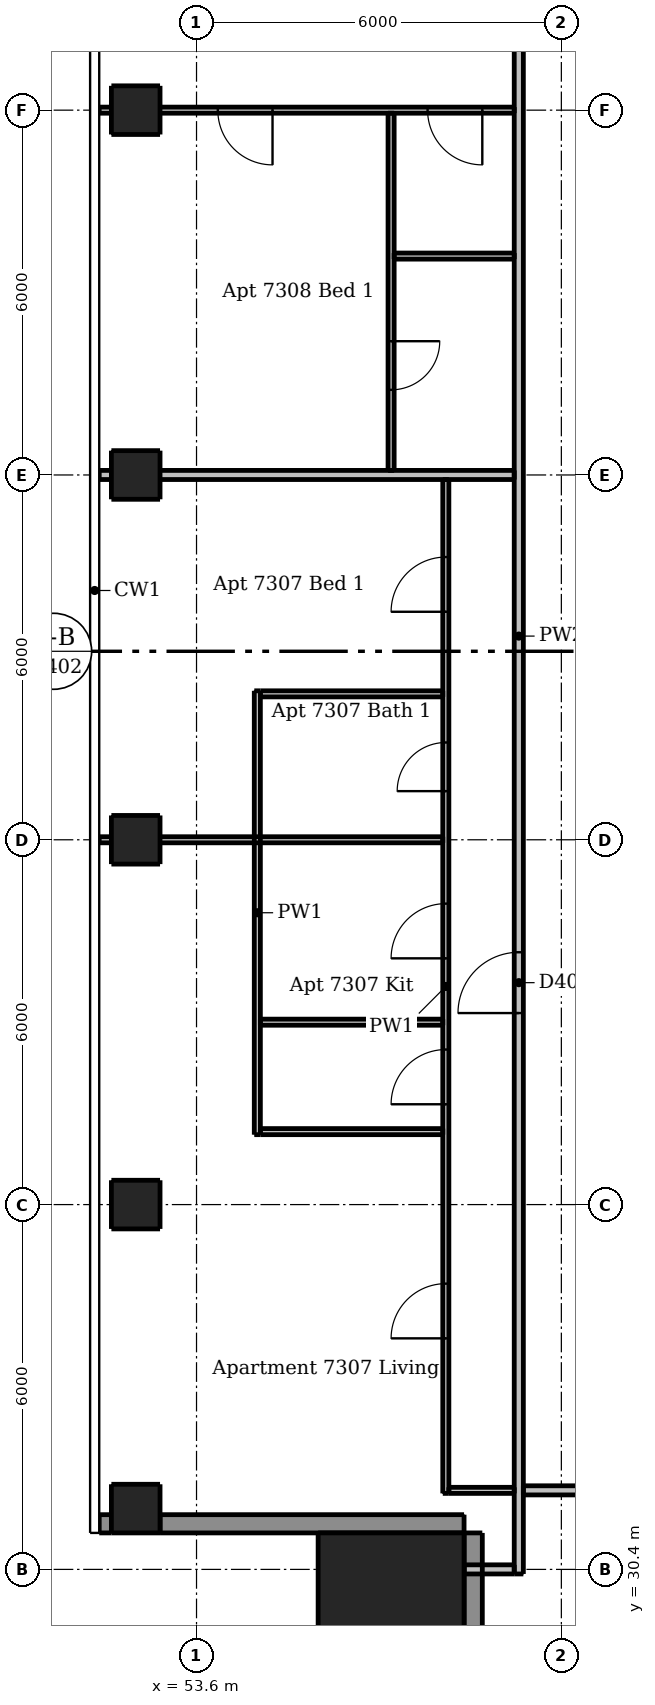
"""IFC4 building model, lengths in metres.
Left out: names, types, materials, properties, quantities, classifications, styles, units other than length and angle.
Written with IfcOpenShell. Run it as: python <this file> out.ifc"""

import sys

from ifc_helpers import new_model, si_unit, direction, frame, frame_2d, origin, origin_2d, place, context, subcontext, project, spatial, rectangle, extrude, element, fill, save


model = new_model("IFC4")
c1 = context("Model", 3, precision=1e-05, world=origin(), true_north=direction((0.0, 1.0)))
c2 = subcontext(c1, "Body", "Model", "MODEL_VIEW")
j1 = project(units=[si_unit("LENGTHUNIT", "METRE"), si_unit("PLANEANGLEUNIT", "RADIAN")], contexts=[c1])
p1 = place(None, origin())
s1 = spatial("IfcSite", under=j1, at=p1, CompositionType="ELEMENT")
p2 = place(p1, origin())
s2 = spatial("IfcBuilding", under=s1, at=p2, CompositionType="ELEMENT")
p3 = place(p2, frame((0.0, 0.0, 271.9)))
s3 = spatial("IfcBuildingStorey", under=s2, at=p3, CompositionType="ELEMENT", Elevation=271.9)
for number, where, z_axis, x_axis in (
    (1, (52.6, 31.4, 0.0), (0.0, 0.0, 1.0), (1.0, 0.0, 0.0)),
    (2, (52.6, 36.4, 0.0), (0.0, 0.0, 1.0), (1.0, 0.0, 0.0)),
    (3, (52.6, 42.4, 0.0), (0.0, 0.0, 1.0), (1.0, 0.0, 0.0)),
    (4, (52.6, 48.4, 0.0), (0.0, 0.0, 1.0), (1.0, 0.0, 0.0)),
    (5, (52.6, 54.4, 0.0), (0.0, 0.0, 1.0), (1.0, 0.0, 0.0)),
):
    element("IfcColumn", number, at=place(p3, frame(where, z_axis=z_axis, x_axis=x_axis)), inside=s3, PredefinedType="COLUMN", context=c2, shape_type="SweptSolid", body=[
        extrude(rectangle(XDim=0.8, YDim=0.8, at=origin_2d()), origin(), (0.0, 0.0, 1.0), 3.05),
    ])
p4 = place(p3, frame((56.8, 29.8, 0.0), z_axis=(0.0, 0.0, 1.0), x_axis=(1.0, 0.0, 0.0)))
e6 = element("IfcColumn", 6, at=p4, inside=s3, PredefinedType="COLUMN", context=c2, shape_type="SweptSolid", body=[
    extrude(rectangle(XDim=2.4, YDim=2.4, at=origin_2d()), origin(), (0.0, 0.0, 1.0), 3.3),
])
p5 = place(p3, frame((52.0, 31.15, 0.0), z_axis=(0.0, 0.0, 1.0), x_axis=(1.0, 0.0, 0.0)))
e7 = element("IfcWall", 7, at=p5, inside=s3, PredefinedType="SOLIDWALL", context=c2, shape_type="SweptSolid", body=[
    extrude(rectangle(XDim=0.2, YDim=0.3, at=frame_2d((0.1, 0.0))), origin(), (0.0, 0.0, 1.0), 3.05),
])
p6 = place(p3, frame((53.0, 31.15, 0.0), z_axis=(0.0, 0.0, 1.0), x_axis=(1.0, 0.0, 0.0)))
e8 = element("IfcWall", 8, at=p6, inside=s3, PredefinedType="SOLIDWALL", context=c2, shape_type="SweptSolid", body=[
    extrude(rectangle(XDim=5.0, YDim=0.3, at=frame_2d((2.5, 0.0))), origin(), (0.0, 0.0, 1.0), 3.05),
])
p7 = place(p3, frame((58.15, 31.0, 0.0), z_axis=(0.0, 0.0, 1.0), x_axis=(0.0, -1.0, 0.0)))
e9 = element("IfcWall", 9, at=p7, inside=s3, PredefinedType="SOLIDWALL", context=c2, shape_type="SweptSolid", body=[
    extrude(rectangle(XDim=6.0, YDim=0.3, at=frame_2d((3.0, 0.0))), origin(), (0.0, 0.0, 1.0), 3.05),
])
p8 = place(p7, frame((1.8, 0.0, 0.15)))
e10 = element("IfcOpeningElement", 10, at=p8, cuts=e9, PredefinedType="OPENING", context=c2, shape_type="SweptSolid", body=[
    extrude(rectangle(XDim=2.4, YDim=2.1, at=frame_2d((1.2, 1.05))), frame((0.0, 0.16, 0.0), z_axis=(0.0, -1.0, 0.0), x_axis=(1.0, 0.0, 0.0)), (0.0, 0.0, 1.0), 0.32),
])
p9 = place(p3, frame((54.6, 37.55, 0.0), z_axis=(0.0, 0.0, 1.0), x_axis=(0.0, 1.0, 0.0)))
e11 = element("IfcWall", 11, at=p9, inside=s3, PredefinedType="PARTITIONING", context=c2, shape_type="SweptSolid", body=[
    extrude(rectangle(XDim=7.3, YDim=0.1, at=frame_2d((3.65, 0.0))), origin(), (0.0, 0.0, 1.0), 3.05),
])
p10 = place(p3, frame((56.8, 54.35, 0.0), z_axis=(0.0, 0.0, 1.0), x_axis=(0.0, -1.0, 0.0)))
e12 = element("IfcWall", 12, at=p10, inside=s3, PredefinedType="PARTITIONING", context=c2, shape_type="SweptSolid", body=[
    extrude(rectangle(XDim=5.875, YDim=0.1, at=frame_2d((2.938, 0.0))), origin(), (0.0, 0.0, 1.0), 3.05),
])
p11 = place(p10, frame((3.75, 0.0, 0.0)))
e13 = element("IfcOpeningElement", 13, at=p11, cuts=e12, PredefinedType="OPENING", context=c2, shape_type="SweptSolid", body=[
    extrude(rectangle(XDim=0.8, YDim=2.1, at=frame_2d((0.4, 1.05))), frame((0.0, 0.06, 0.0), z_axis=(0.0, -1.0, 0.0), x_axis=(1.0, 0.0, 0.0)), (0.0, 0.0, 1.0), 0.12),
])
p12 = place(p3, frame((57.7, 31.65, 0.0), z_axis=(0.0, 0.0, 1.0), x_axis=(0.0, 1.0, 0.0)))
e14 = element("IfcWall", 14, at=p12, inside=s3, PredefinedType="PARTITIONING", context=c2, shape_type="SweptSolid", body=[
    extrude(rectangle(XDim=16.675, YDim=0.1, at=frame_2d((8.337, 0.0))), origin(), (0.0, 0.0, 1.0), 3.05),
])
p13 = place(p12, frame((2.55, 0.0, 0.0)))
e15 = element("IfcOpeningElement", 15, at=p13, cuts=e14, PredefinedType="OPENING", context=c2, shape_type="SweptSolid", body=[
    extrude(rectangle(XDim=0.9, YDim=2.1, at=frame_2d((0.45, 1.05))), frame((0.0, 0.06, 0.0), z_axis=(0.0, -1.0, 0.0), x_axis=(1.0, 0.0, 0.0)), (0.0, 0.0, 1.0), 0.12),
])
p14 = place(p12, frame((8.8, 0.0, 0.0)))
e16 = element("IfcOpeningElement", 16, at=p14, cuts=e14, PredefinedType="OPENING", context=c2, shape_type="SweptSolid", body=[
    extrude(rectangle(XDim=0.9, YDim=2.1, at=frame_2d((0.45, 1.05))), frame((0.0, 0.06, 0.0), z_axis=(0.0, -1.0, 0.0), x_axis=(1.0, 0.0, 0.0)), (0.0, 0.0, 1.0), 0.12),
])
p15 = place(p12, frame((6.4, 0.0, 0.0)))
e17 = element("IfcOpeningElement", 17, at=p15, cuts=e14, PredefinedType="OPENING", context=c2, shape_type="SweptSolid", body=[
    extrude(rectangle(XDim=0.9, YDim=2.1, at=frame_2d((0.45, 1.05))), frame((0.0, 0.06, 0.0), z_axis=(0.0, -1.0, 0.0), x_axis=(1.0, 0.0, 0.0)), (0.0, 0.0, 1.0), 0.12),
])
p16 = place(p12, frame((14.5, 0.0, 0.0)))
e18 = element("IfcOpeningElement", 18, at=p16, cuts=e14, PredefinedType="OPENING", context=c2, shape_type="SweptSolid", body=[
    extrude(rectangle(XDim=0.9, YDim=2.1, at=frame_2d((0.45, 1.05))), frame((0.0, 0.06, 0.0), z_axis=(0.0, -1.0, 0.0), x_axis=(1.0, 0.0, 0.0)), (0.0, 0.0, 1.0), 0.12),
])
p17 = place(p12, frame((11.55, 0.0, 0.0)))
e19 = element("IfcOpeningElement", 19, at=p17, cuts=e14, PredefinedType="OPENING", context=c2, shape_type="SweptSolid", body=[
    extrude(rectangle(XDim=0.8, YDim=2.1, at=frame_2d((0.4, 1.05))), frame((0.0, 0.06, 0.0), z_axis=(0.0, -1.0, 0.0), x_axis=(1.0, 0.0, 0.0)), (0.0, 0.0, 1.0), 0.12),
])
p18 = place(p3, frame((58.825, 54.4, 0.0), z_axis=(0.0, 0.0, 1.0), x_axis=(-1.0, 0.0, 0.0)))
e20 = element("IfcWall", 20, at=p18, inside=s3, PredefinedType="PARTITIONING", context=c2, shape_type="SweptSolid", body=[
    extrude(rectangle(XDim=6.825, YDim=0.1, at=frame_2d((3.413, 0.0))), origin(), (0.0, 0.0, 1.0), 2.516),
])
p19 = place(p18, frame((0.525, 0.0, 0.0)))
e21 = element("IfcOpeningElement", 21, at=p19, cuts=e20, PredefinedType="OPENING", context=c2, shape_type="SweptSolid", body=[
    extrude(rectangle(XDim=0.9, YDim=2.1, at=frame_2d((0.45, 1.05))), frame((0.0, 0.06, 0.0), z_axis=(0.0, -1.0, 0.0), x_axis=(1.0, 0.0, 0.0)), (0.0, 0.0, 1.0), 0.12),
])
p20 = place(p18, frame((3.975, 0.0, 0.0)))
e22 = element("IfcOpeningElement", 22, at=p20, cuts=e20, PredefinedType="OPENING", context=c2, shape_type="SweptSolid", body=[
    extrude(rectangle(XDim=0.9, YDim=2.1, at=frame_2d((0.45, 1.05))), frame((0.0, 0.06, 0.0), z_axis=(0.0, -1.0, 0.0), x_axis=(1.0, 0.0, 0.0)), (0.0, 0.0, 1.0), 0.12),
])
p21 = place(p3, frame((56.85, 52.0, 0.0), z_axis=(0.0, 0.0, 1.0), x_axis=(1.0, 0.0, 0.0)))
e23 = element("IfcWall", 23, at=p21, inside=s3, PredefinedType="PARTITIONING", context=c2, shape_type="SweptSolid", body=[
    extrude(rectangle(XDim=1.975, YDim=0.1, at=frame_2d((0.987, 0.0))), origin(), (0.0, 0.0, 1.0), 3.05),
])
p22 = place(p3, frame((54.65, 44.8, 0.0), z_axis=(0.0, 0.0, 1.0), x_axis=(1.0, 0.0, 0.0)))
e24 = element("IfcWall", 24, at=p22, inside=s3, PredefinedType="PARTITIONING", context=c2, shape_type="SweptSolid", body=[
    extrude(rectangle(XDim=3.0, YDim=0.1, at=frame_2d((1.5, 0.0))), origin(), (0.0, 0.0, 1.0), 3.05),
])
p23 = place(p3, frame((52.0, 42.4, 0.0), z_axis=(0.0, 0.0, 1.0), x_axis=(1.0, 0.0, 0.0)))
e25 = element("IfcWall", 25, at=p23, inside=s3, PredefinedType="PARTITIONING", context=c2, shape_type="SweptSolid", body=[
    extrude(rectangle(XDim=5.65, YDim=0.1, at=frame_2d((2.825, 0.0))), origin(), (0.0, 0.0, 1.0), 2.516),
])
for number, where, z_axis, x_axis in (
    (26, (54.65, 39.4, 0.0), (0.0, 0.0, 1.0), (1.0, 0.0, 0.0)),
    (27, (54.65, 37.6, 0.0), (0.0, 0.0, 1.0), (1.0, 0.0, 0.0)),
):
    element("IfcWall", number, at=place(p3, frame(where, z_axis=z_axis, x_axis=x_axis)), inside=s3, PredefinedType="PARTITIONING", context=c2, shape_type="SweptSolid", body=[
        extrude(rectangle(XDim=3.0, YDim=0.1, at=frame_2d((1.5, 0.0))), origin(), (0.0, 0.0, 1.0), 3.05),
    ])
p24 = place(p3, frame((57.75, 31.7, 0.0), z_axis=(0.0, 0.0, 1.0), x_axis=(1.0, 0.0, 0.0)))
e28 = element("IfcWall", 28, at=p24, inside=s3, PredefinedType="PARTITIONING", context=c2, shape_type="SweptSolid", body=[
    extrude(rectangle(XDim=1.075, YDim=0.1, at=frame_2d((0.538, 0.0))), origin(), (0.0, 0.0, 1.0), 3.05),
])
p25 = place(p3, frame((58.9, 30.325, 0.0), z_axis=(0.0, 0.0, 1.0), x_axis=(0.0, 1.0, 0.0)))
e29 = element("IfcWall", 29, at=p25, inside=s3, PredefinedType="PARTITIONING", context=c2, shape_type="SweptSolid", body=[
    extrude(rectangle(XDim=30.85, YDim=0.15, at=frame_2d((15.425, 0.0))), origin(), (0.0, 0.0, 1.0), 3.05),
])
p26 = place(p25, frame((9.225, 0.0, 0.0)))
e30 = element("IfcOpeningElement", 30, at=p26, cuts=e29, PredefinedType="OPENING", context=c2, shape_type="SweptSolid", body=[
    extrude(rectangle(XDim=1.0, YDim=2.1, at=frame_2d((0.5, 1.05))), frame((0.0, 0.085, 0.0), z_axis=(0.0, -1.0, 0.0), x_axis=(1.0, 0.0, 0.0)), (0.0, 0.0, 1.0), 0.17),
])
p27 = place(p25, frame((26.925, 0.0, 0.0)))
e31 = element("IfcOpeningElement", 31, at=p27, cuts=e29, PredefinedType="OPENING", context=c2, shape_type="SweptSolid", body=[
    extrude(rectangle(XDim=1.0, YDim=2.1, at=frame_2d((0.5, 1.05))), frame((0.0, 0.085, 0.0), z_axis=(0.0, -1.0, 0.0), x_axis=(1.0, 0.0, 0.0)), (0.0, 0.0, 1.0), 0.17),
])
p28 = place(p3, frame((52.0, 48.4, 0.0), z_axis=(0.0, 0.0, 1.0), x_axis=(1.0, 0.0, 0.0)))
e32 = element("IfcWall", 32, at=p28, inside=s3, PredefinedType="PARTITIONING", context=c2, shape_type="SweptSolid", body=[
    extrude(rectangle(XDim=6.825, YDim=0.15, at=frame_2d((3.413, 0.0))), origin(), (0.0, 0.0, 1.0), 2.516),
])
p29 = place(p3, frame((89.525, 31.7, 0.0), z_axis=(0.0, 0.0, 1.0), x_axis=(-1.0, 0.0, 0.0)))
e33 = element("IfcWall", 33, at=p29, inside=s3, PredefinedType="PARTITIONING", context=c2, shape_type="SweptSolid", body=[
    extrude(rectangle(XDim=30.55, YDim=0.15, at=frame_2d((15.275, 0.0))), origin(), (0.0, 0.0, 1.0), 3.05),
])
p30 = place(p29, frame((28.275, 0.0, 0.0)))
e34 = element("IfcOpeningElement", 34, at=p30, cuts=e33, PredefinedType="OPENING", context=c2, shape_type="SweptSolid", body=[
    extrude(rectangle(XDim=1.0, YDim=2.1, at=frame_2d((0.5, 1.05))), frame((0.0, 0.085, 0.0), z_axis=(0.0, -1.0, 0.0), x_axis=(1.0, 0.0, 0.0)), (0.0, 0.0, 1.0), 0.17),
])
p31 = place(p29, frame((11.425, 0.0, 0.0)))
e35 = element("IfcOpeningElement", 35, at=p31, cuts=e33, PredefinedType="OPENING", context=c2, shape_type="SweptSolid", body=[
    extrude(rectangle(XDim=1.0, YDim=2.1, at=frame_2d((0.5, 1.05))), frame((0.0, 0.085, 0.0), z_axis=(0.0, -1.0, 0.0), x_axis=(1.0, 0.0, 0.0)), (0.0, 0.0, 1.0), 0.17),
])
p32 = place(p3, frame((58.0, 30.4, 0.0), z_axis=(0.0, 0.0, 1.0), x_axis=(1.0, 0.0, 0.0)))
e36 = element("IfcWall", 36, at=p32, inside=s3, PredefinedType="PARTITIONING", context=c2, shape_type="SweptSolid", body=[
    extrude(rectangle(XDim=0.825, YDim=0.15, at=frame_2d((0.413, 0.0))), origin(), (0.0, 0.0, 1.0), 3.05),
])
p33 = place(p26, origin())
e37 = element("IfcDoor", 37, at=p33, inside=s3, OperationType="SINGLE_SWING_LEFT", PredefinedType="DOOR", context=c2, shape_type="SweptSolid", body=[
    extrude(rectangle(XDim=1.0, YDim=2.1, at=frame_2d((0.5, 1.05))), frame((0.0, 0.025, 0.0), z_axis=(0.0, -1.0, 0.0), x_axis=(1.0, 0.0, 0.0)), (0.0, 0.0, 1.0), 0.05),
])
fill(e30, e37)
p34 = place(p13, origin())
e38 = element("IfcDoor", 38, at=p34, inside=s3, OperationType="SINGLE_SWING_LEFT", PredefinedType="DOOR", context=c2, shape_type="SweptSolid", body=[
    extrude(rectangle(XDim=0.9, YDim=2.1, at=frame_2d((0.45, 1.05))), frame((0.0, 0.025, 0.0), z_axis=(0.0, -1.0, 0.0), x_axis=(1.0, 0.0, 0.0)), (0.0, 0.0, 1.0), 0.05),
])
fill(e15, e38)
p35 = place(p14, origin())
e39 = element("IfcDoor", 39, at=p35, inside=s3, OperationType="SINGLE_SWING_LEFT", PredefinedType="DOOR", context=c2, shape_type="SweptSolid", body=[
    extrude(rectangle(XDim=0.9, YDim=2.1, at=frame_2d((0.45, 1.05))), frame((0.0, 0.025, 0.0), z_axis=(0.0, -1.0, 0.0), x_axis=(1.0, 0.0, 0.0)), (0.0, 0.0, 1.0), 0.05),
])
fill(e16, e39)
p36 = place(p15, origin())
e40 = element("IfcDoor", 40, at=p36, inside=s3, OperationType="SINGLE_SWING_LEFT", PredefinedType="DOOR", context=c2, shape_type="SweptSolid", body=[
    extrude(rectangle(XDim=0.9, YDim=2.1, at=frame_2d((0.45, 1.05))), frame((0.0, 0.025, 0.0), z_axis=(0.0, -1.0, 0.0), x_axis=(1.0, 0.0, 0.0)), (0.0, 0.0, 1.0), 0.05),
])
fill(e17, e40)
p37 = place(p16, origin())
e41 = element("IfcDoor", 41, at=p37, inside=s3, OperationType="SINGLE_SWING_LEFT", PredefinedType="DOOR", context=c2, shape_type="SweptSolid", body=[
    extrude(rectangle(XDim=0.9, YDim=2.1, at=frame_2d((0.45, 1.05))), frame((0.0, 0.025, 0.0), z_axis=(0.0, -1.0, 0.0), x_axis=(1.0, 0.0, 0.0)), (0.0, 0.0, 1.0), 0.05),
])
fill(e18, e41)
p38 = place(p17, origin())
e42 = element("IfcDoor", 42, at=p38, inside=s3, OperationType="SINGLE_SWING_LEFT", PredefinedType="DOOR", context=c2, shape_type="SweptSolid", body=[
    extrude(rectangle(XDim=0.8, YDim=2.1, at=frame_2d((0.4, 1.05))), frame((0.0, 0.025, 0.0), z_axis=(0.0, -1.0, 0.0), x_axis=(1.0, 0.0, 0.0)), (0.0, 0.0, 1.0), 0.05),
])
fill(e19, e42)
p39 = place(p19, origin())
e43 = element("IfcDoor", 43, at=p39, inside=s3, OperationType="SINGLE_SWING_LEFT", PredefinedType="DOOR", context=c2, shape_type="SweptSolid", body=[
    extrude(rectangle(XDim=0.9, YDim=2.1, at=frame_2d((0.45, 1.05))), frame((0.0, 0.025, 0.0), z_axis=(0.0, -1.0, 0.0), x_axis=(1.0, 0.0, 0.0)), (0.0, 0.0, 1.0), 0.05),
])
fill(e21, e43)
p40 = place(p20, origin())
e44 = element("IfcDoor", 44, at=p40, inside=s3, OperationType="SINGLE_SWING_LEFT", PredefinedType="DOOR", context=c2, shape_type="SweptSolid", body=[
    extrude(rectangle(XDim=0.9, YDim=2.1, at=frame_2d((0.45, 1.05))), frame((0.0, 0.025, 0.0), z_axis=(0.0, -1.0, 0.0), x_axis=(1.0, 0.0, 0.0)), (0.0, 0.0, 1.0), 0.05),
])
fill(e22, e44)
p41 = place(p11, origin())
e45 = element("IfcDoor", 45, at=p41, inside=s3, OperationType="SINGLE_SWING_LEFT", PredefinedType="DOOR", context=c2, shape_type="SweptSolid", body=[
    extrude(rectangle(XDim=0.8, YDim=2.1, at=frame_2d((0.4, 1.05))), frame((0.0, 0.025, 0.0), z_axis=(0.0, -1.0, 0.0), x_axis=(1.0, 0.0, 0.0)), (0.0, 0.0, 1.0), 0.05),
])
fill(e13, e45)
save(model, sys.argv[1])
